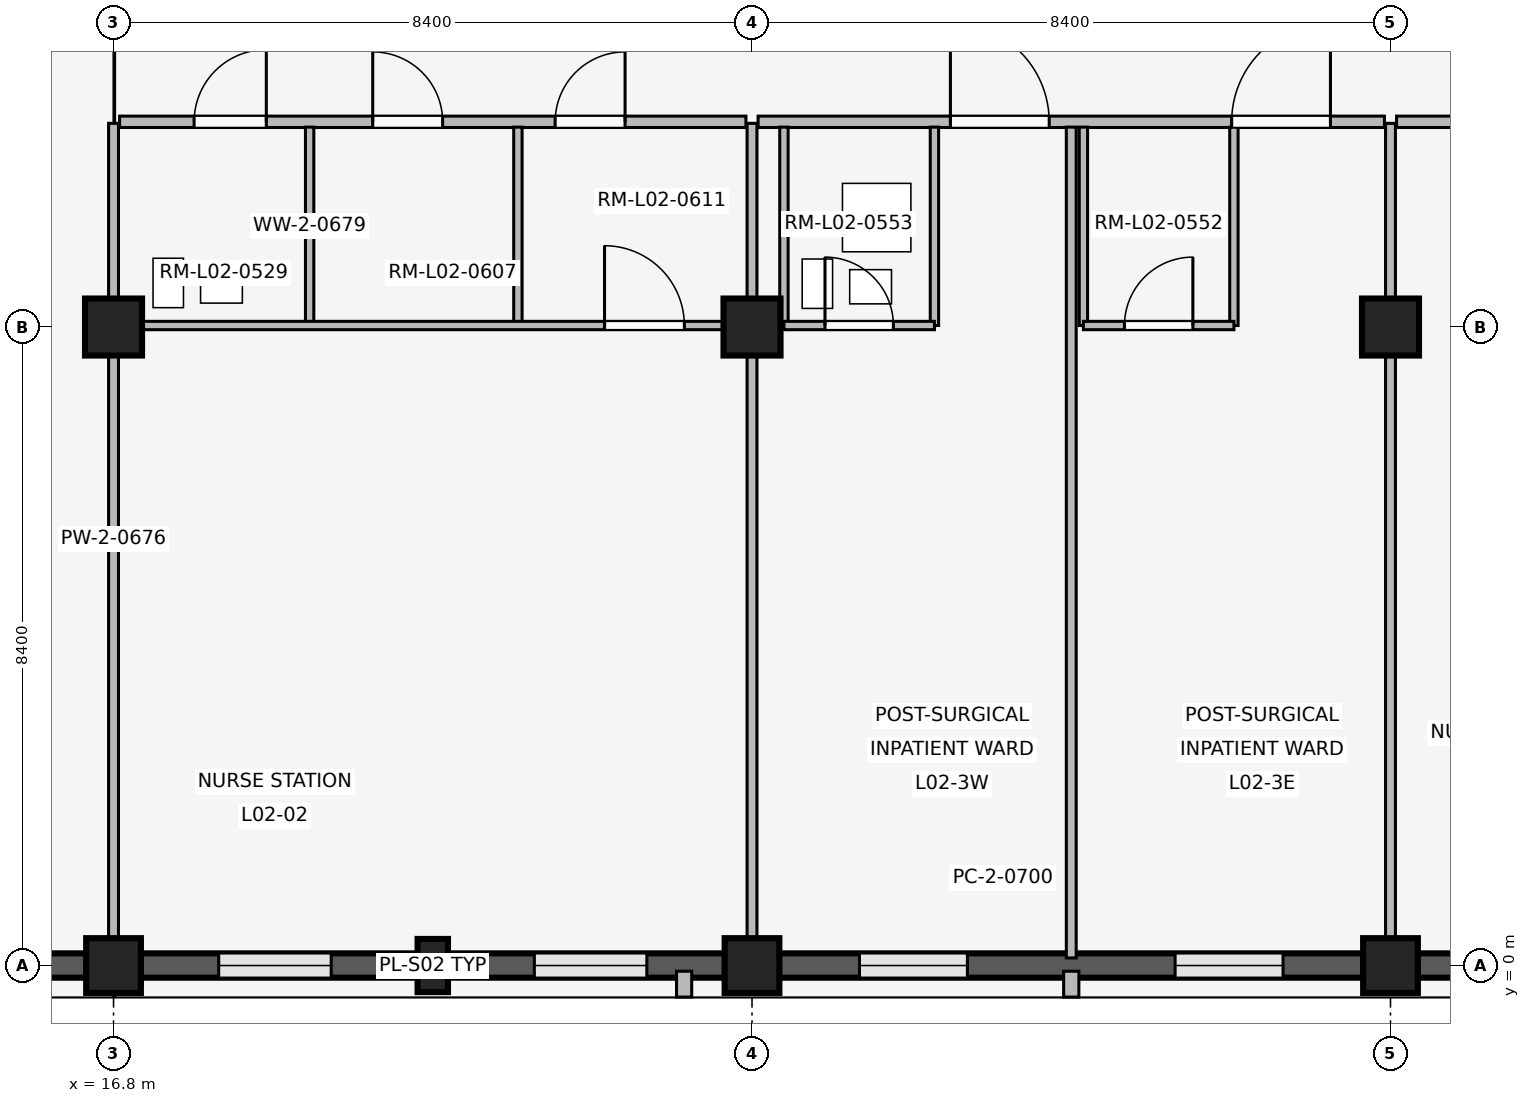
"""IFC4 building model, lengths in metres.
Left out: names, types, materials, properties, quantities, classifications, styles, units other than length and angle.
Written with IfcOpenShell. Run it as: python <this file> out.ifc"""

import sys

from ifc_helpers import new_model, si_unit, direction, frame, frame_2d, origin, origin_2d, place, context, subcontext, project, spatial, rectangle, extrude, element, fill, save


model = new_model("IFC4")
c1 = context("Model", 3, precision=1e-05, world=origin(), true_north=direction((0.0, 1.0)))
c2 = subcontext(c1, "Body", "Model", "MODEL_VIEW")
j1 = project(units=[si_unit("LENGTHUNIT", "METRE"), si_unit("PLANEANGLEUNIT", "RADIAN")], contexts=[c1])
p1 = place(None, origin())
s1 = spatial("IfcSite", under=j1, at=p1, CompositionType="ELEMENT")
p2 = place(p1, origin())
s2 = spatial("IfcBuilding", under=s1, at=p2, CompositionType="ELEMENT")
p3 = place(p2, frame((0.0, 0.0, 8.1)))
s3 = spatial("IfcBuildingStorey", under=s2, at=p3, CompositionType="ELEMENT", Elevation=8.1)
p4 = place(p3, frame((16.8, 0.0, 0.0), z_axis=(0.0, 0.0, 1.0), x_axis=(1.0, 0.0, 0.0)))
e1 = element("IfcColumn", 1, at=p4, inside=s3, PredefinedType="COLUMN", context=c2, shape_type="SweptSolid", body=[
    extrude(rectangle(XDim=0.72, YDim=0.72, at=origin_2d()), origin(), (0.0, 0.0, 1.0), 4.8),
])
p5 = place(p3, frame((16.8, 8.4, 0.0), z_axis=(0.0, 0.0, 1.0), x_axis=(1.0, 0.0, 0.0)))
e2 = element("IfcColumn", 2, at=p5, inside=s3, PredefinedType="COLUMN", context=c2, shape_type="SweptSolid", body=[
    extrude(rectangle(XDim=0.75, YDim=0.75, at=origin_2d()), origin(), (0.0, 0.0, 1.0), 4.8),
])
p6 = place(p3, frame((25.2, 0.0, 0.0), z_axis=(0.0, 0.0, 1.0), x_axis=(1.0, 0.0, 0.0)))
e3 = element("IfcColumn", 3, at=p6, inside=s3, PredefinedType="COLUMN", context=c2, shape_type="SweptSolid", body=[
    extrude(rectangle(XDim=0.72, YDim=0.72, at=origin_2d()), origin(), (0.0, 0.0, 1.0), 4.8),
])
p7 = place(p3, frame((25.2, 8.4, 0.0), z_axis=(0.0, 0.0, 1.0), x_axis=(1.0, 0.0, 0.0)))
e4 = element("IfcColumn", 4, at=p7, inside=s3, PredefinedType="COLUMN", context=c2, shape_type="SweptSolid", body=[
    extrude(rectangle(XDim=0.75, YDim=0.75, at=origin_2d()), origin(), (0.0, 0.0, 1.0), 4.8),
])
p8 = place(p3, frame((33.6, 0.0, 0.0), z_axis=(0.0, 0.0, 1.0), x_axis=(1.0, 0.0, 0.0)))
e5 = element("IfcColumn", 5, at=p8, inside=s3, PredefinedType="COLUMN", context=c2, shape_type="SweptSolid", body=[
    extrude(rectangle(XDim=0.72, YDim=0.72, at=origin_2d()), origin(), (0.0, 0.0, 1.0), 4.8),
])
p9 = place(p3, frame((33.6, 8.4, 0.0), z_axis=(0.0, 0.0, 1.0), x_axis=(1.0, 0.0, 0.0)))
e6 = element("IfcColumn", 6, at=p9, inside=s3, PredefinedType="COLUMN", context=c2, shape_type="SweptSolid", body=[
    extrude(rectangle(XDim=0.75, YDim=0.75, at=origin_2d()), origin(), (0.0, 0.0, 1.0), 4.8),
])
p10 = place(p3, frame((21.0, 0.0, 0.0), z_axis=(0.0, 0.0, 1.0), x_axis=(1.0, 0.0, 0.0)))
e7 = element("IfcColumn", 7, at=p10, inside=s3, PredefinedType="PILASTER", context=c2, shape_type="SweptSolid", body=[
    extrude(rectangle(XDim=0.4, YDim=0.7, at=origin_2d()), origin(), (0.0, 0.0, 1.0), 4.8),
])
p11 = place(p3, frame((16.445, 0.0, 0.0), z_axis=(0.0, 0.0, 1.0), x_axis=(-1.0, 0.0, 0.0)))
e8 = element("IfcWall", 8, at=p11, inside=s3, PredefinedType="SOLIDWALL", context=c2, shape_type="SweptSolid", body=[
    extrude(rectangle(XDim=7.69, YDim=0.32, at=frame_2d((3.845, 0.0))), origin(), (0.0, 0.0, 1.0), 3.86),
])
p12 = place(p11, frame((0.979, 0.0, 0.85)))
e9 = element("IfcOpeningElement", 9, at=p12, cuts=e8, PredefinedType="OPENING", context=c2, shape_type="SweptSolid", body=[
    extrude(rectangle(XDim=1.58, YDim=1.7, at=frame_2d((0.79, 0.85))), frame((0.0, 0.17, 0.0), z_axis=(0.0, -1.0, 0.0), x_axis=(1.0, 0.0, 0.0)), (0.0, 0.0, 1.0), 0.34),
])
p13 = place(p11, frame((5.131, 0.0, 0.85)))
e10 = element("IfcOpeningElement", 10, at=p13, cuts=e8, PredefinedType="OPENING", context=c2, shape_type="SweptSolid", body=[
    extrude(rectangle(XDim=1.58, YDim=1.7, at=frame_2d((0.79, 0.85))), frame((0.0, 0.17, 0.0), z_axis=(0.0, -1.0, 0.0), x_axis=(1.0, 0.0, 0.0)), (0.0, 0.0, 1.0), 0.34),
])
p14 = place(p3, frame((24.845, 0.0, 0.0), z_axis=(0.0, 0.0, 1.0), x_axis=(-1.0, 0.0, 0.0)))
e11 = element("IfcWall", 11, at=p14, inside=s3, PredefinedType="SOLIDWALL", context=c2, shape_type="SweptSolid", body=[
    extrude(rectangle(XDim=7.69, YDim=0.32, at=frame_2d((3.845, 0.0))), origin(), (0.0, 0.0, 1.0), 3.86),
])
p15 = place(p14, frame((1.029, 0.0, 0.85)))
e12 = element("IfcOpeningElement", 12, at=p15, cuts=e11, PredefinedType="OPENING", context=c2, shape_type="SweptSolid", body=[
    extrude(rectangle(XDim=1.48, YDim=1.6, at=frame_2d((0.74, 0.8))), frame((0.0, 0.17, 0.0), z_axis=(0.0, -1.0, 0.0), x_axis=(1.0, 0.0, 0.0)), (0.0, 0.0, 1.0), 0.34),
])
p16 = place(p14, frame((5.181, 0.0, 0.85)))
e13 = element("IfcOpeningElement", 13, at=p16, cuts=e11, PredefinedType="OPENING", context=c2, shape_type="SweptSolid", body=[
    extrude(rectangle(XDim=1.48, YDim=1.6, at=frame_2d((0.74, 0.8))), frame((0.0, 0.17, 0.0), z_axis=(0.0, -1.0, 0.0), x_axis=(1.0, 0.0, 0.0)), (0.0, 0.0, 1.0), 0.34),
])
p17 = place(p3, frame((24.307, -0.075, 0.0), z_axis=(0.0, 0.0, 1.0), x_axis=(0.0, -1.0, 0.0)))
e14 = element("IfcWall", 14, at=p17, inside=s3, PredefinedType="ELEMENTEDWALL", context=c2, shape_type="SweptSolid", body=[
    extrude(rectangle(XDim=0.34, YDim=0.2, at=frame_2d((0.17, 0.0))), origin(), (0.0, 0.0, 1.0), 3.84),
])
p18 = place(p3, frame((33.245, 0.0, 0.0), z_axis=(0.0, 0.0, 1.0), x_axis=(-1.0, 0.0, 0.0)))
e15 = element("IfcWall", 15, at=p18, inside=s3, PredefinedType="SOLIDWALL", context=c2, shape_type="SweptSolid", body=[
    extrude(rectangle(XDim=7.69, YDim=0.32, at=frame_2d((3.845, 0.0))), origin(), (0.0, 0.0, 1.0), 3.86),
])
p19 = place(p18, frame((1.059, 0.0, 0.85)))
e16 = element("IfcOpeningElement", 16, at=p19, cuts=e15, PredefinedType="OPENING", context=c2, shape_type="SweptSolid", body=[
    extrude(rectangle(XDim=1.42, YDim=1.45, at=frame_2d((0.71, 0.725))), frame((0.0, 0.17, 0.0), z_axis=(0.0, -1.0, 0.0), x_axis=(1.0, 0.0, 0.0)), (0.0, 0.0, 1.0), 0.34),
])
p20 = place(p18, frame((5.211, 0.0, 0.85)))
e17 = element("IfcOpeningElement", 17, at=p20, cuts=e15, PredefinedType="OPENING", context=c2, shape_type="SweptSolid", body=[
    extrude(rectangle(XDim=1.42, YDim=1.45, at=frame_2d((0.71, 0.725))), frame((0.0, 0.17, 0.0), z_axis=(0.0, -1.0, 0.0), x_axis=(1.0, 0.0, 0.0)), (0.0, 0.0, 1.0), 0.34),
])
p21 = place(p3, frame((29.4, -0.075, 0.0), z_axis=(0.0, 0.0, 1.0), x_axis=(0.0, -1.0, 0.0)))
e18 = element("IfcWall", 18, at=p21, inside=s3, PredefinedType="ELEMENTEDWALL", context=c2, shape_type="SweptSolid", body=[
    extrude(rectangle(XDim=0.34, YDim=0.2, at=frame_2d((0.17, 0.0))), origin(), (0.0, 0.0, 1.0), 3.84),
])
p22 = place(p3, frame((41.645, 0.0, 0.0), z_axis=(0.0, 0.0, 1.0), x_axis=(-1.0, 0.0, 0.0)))
e19 = element("IfcWall", 19, at=p22, inside=s3, PredefinedType="SOLIDWALL", context=c2, shape_type="SweptSolid", body=[
    extrude(rectangle(XDim=7.69, YDim=0.32, at=frame_2d((3.845, 0.0))), origin(), (0.0, 0.0, 1.0), 3.86),
])
p23 = place(p22, frame((5.091, 0.0, 0.85)))
e20 = element("IfcOpeningElement", 20, at=p23, cuts=e19, PredefinedType="OPENING", context=c2, shape_type="SweptSolid", body=[
    extrude(rectangle(XDim=1.66, YDim=1.95, at=frame_2d((0.83, 0.975))), frame((0.0, 0.17, 0.0), z_axis=(0.0, -1.0, 0.0), x_axis=(1.0, 0.0, 0.0)), (0.0, 0.0, 1.0), 0.34),
])
p24 = place(p3, frame((16.8, 0.14, 0.0), z_axis=(0.0, 0.0, 1.0), x_axis=(0.0, 1.0, 0.0)))
e21 = element("IfcWall", 21, at=p24, inside=s3, PredefinedType="PARTITIONING", context=c2, shape_type="SweptSolid", body=[
    extrude(rectangle(XDim=10.94, YDim=0.13, at=frame_2d((5.47, 0.0))), origin(), (0.0, 0.0, 1.0), 3.84),
])
p25 = place(p3, frame((16.88, 11.1, 0.0), z_axis=(0.0, 0.0, 1.0), x_axis=(1.0, 0.0, 0.0)))
e22 = element("IfcWall", 22, at=p25, inside=s3, PredefinedType="PARTITIONING", context=c2, shape_type="SweptSolid", body=[
    extrude(rectangle(XDim=8.24, YDim=0.15, at=frame_2d((4.12, 0.0))), origin(), (0.0, 0.0, 1.0), 3.84),
])
p26 = place(p25, frame((0.98, 0.0, 0.0)))
e23 = element("IfcOpeningElement", 23, at=p26, cuts=e22, PredefinedType="OPENING", context=c2, shape_type="SweptSolid", body=[
    extrude(rectangle(XDim=0.95, YDim=2.15, at=frame_2d((0.475, 1.075))), frame((0.0, 0.085, 0.0), z_axis=(0.0, -1.0, 0.0), x_axis=(1.0, 0.0, 0.0)), (0.0, 0.0, 1.0), 0.17),
])
p27 = place(p25, frame((3.33, 0.0, 0.0)))
e24 = element("IfcOpeningElement", 24, at=p27, cuts=e22, PredefinedType="OPENING", context=c2, shape_type="SweptSolid", body=[
    extrude(rectangle(XDim=0.92, YDim=2.1, at=frame_2d((0.46, 1.05))), frame((0.0, 0.085, 0.0), z_axis=(0.0, -1.0, 0.0), x_axis=(1.0, 0.0, 0.0)), (0.0, 0.0, 1.0), 0.17),
])
p28 = place(p25, frame((5.73, 0.0, 0.0)))
e25 = element("IfcOpeningElement", 25, at=p28, cuts=e22, PredefinedType="OPENING", context=c2, shape_type="SweptSolid", body=[
    extrude(rectangle(XDim=0.92, YDim=2.1, at=frame_2d((0.46, 1.05))), frame((0.0, 0.085, 0.0), z_axis=(0.0, -1.0, 0.0), x_axis=(1.0, 0.0, 0.0)), (0.0, 0.0, 1.0), 0.17),
])
for number, where, z_axis, x_axis in (
    (26, (19.38, 8.44, 0.0), (0.0, 0.0, 1.0), (0.0, 1.0, 0.0)),
    (27, (22.12, 8.44, 0.0), (0.0, 0.0, 1.0), (0.0, 1.0, 0.0)),
):
    element("IfcWall", number, at=place(p3, frame(where, z_axis=z_axis, x_axis=x_axis)), inside=s3, PredefinedType="PARTITIONING", context=c2, shape_type="SweptSolid", body=[
        extrude(rectangle(XDim=2.59, YDim=0.11, at=frame_2d((1.295, 0.0))), origin(), (0.0, 0.0, 1.0), 3.84),
    ])
p29 = place(p3, frame((16.88, 8.42, 0.0), z_axis=(0.0, 0.0, 1.0), x_axis=(1.0, 0.0, 0.0)))
e28 = element("IfcWall", 28, at=p29, inside=s3, PredefinedType="PARTITIONING", context=c2, shape_type="SweptSolid", body=[
    extrude(rectangle(XDim=8.24, YDim=0.11, at=frame_2d((4.12, 0.0))), origin(), (0.0, 0.0, 1.0), 3.84),
])
p30 = place(p29, frame((6.38, 0.0, 0.0)))
e29 = element("IfcOpeningElement", 29, at=p30, cuts=e28, PredefinedType="OPENING", context=c2, shape_type="SweptSolid", body=[
    extrude(rectangle(XDim=1.05, YDim=2.2, at=frame_2d((0.525, 1.1))), frame((0.0, 0.065, 0.0), z_axis=(0.0, -1.0, 0.0), x_axis=(1.0, 0.0, 0.0)), (0.0, 0.0, 1.0), 0.13),
])
p31 = place(p3, frame((25.2, 0.14, 0.0), z_axis=(0.0, 0.0, 1.0), x_axis=(0.0, 1.0, 0.0)))
e30 = element("IfcWall", 30, at=p31, inside=s3, PredefinedType="PARTITIONING", context=c2, shape_type="SweptSolid", body=[
    extrude(rectangle(XDim=10.94, YDim=0.13, at=frame_2d((5.47, 0.0))), origin(), (0.0, 0.0, 1.0), 3.84),
])
p32 = place(p3, frame((25.28, 11.1, 0.0), z_axis=(0.0, 0.0, 1.0), x_axis=(1.0, 0.0, 0.0)))
e31 = element("IfcWall", 31, at=p32, inside=s3, PredefinedType="PARTITIONING", context=c2, shape_type="SweptSolid", body=[
    extrude(rectangle(XDim=8.24, YDim=0.15, at=frame_2d((4.12, 0.0))), origin(), (0.0, 0.0, 1.0), 3.84),
])
p33 = place(p32, frame((2.53, 0.0, 0.0)))
e32 = element("IfcOpeningElement", 32, at=p33, cuts=e31, PredefinedType="OPENING", context=c2, shape_type="SweptSolid", body=[
    extrude(rectangle(XDim=1.3, YDim=2.25, at=frame_2d((0.65, 1.125))), frame((0.0, 0.085, 0.0), z_axis=(0.0, -1.0, 0.0), x_axis=(1.0, 0.0, 0.0)), (0.0, 0.0, 1.0), 0.17),
])
p34 = place(p32, frame((6.23, 0.0, 0.0)))
e33 = element("IfcOpeningElement", 33, at=p34, cuts=e31, PredefinedType="OPENING", context=c2, shape_type="SweptSolid", body=[
    extrude(rectangle(XDim=1.3, YDim=2.25, at=frame_2d((0.65, 1.125))), frame((0.0, 0.085, 0.0), z_axis=(0.0, -1.0, 0.0), x_axis=(1.0, 0.0, 0.0)), (0.0, 0.0, 1.0), 0.17),
])
p35 = place(p3, frame((29.4, 0.1, 0.0), z_axis=(0.0, 0.0, 1.0), x_axis=(0.0, 1.0, 0.0)))
e34 = element("IfcWall", 34, at=p35, inside=s3, PredefinedType="PARTITIONING", context=c2, shape_type="SweptSolid", body=[
    extrude(rectangle(XDim=10.93, YDim=0.13, at=frame_2d((5.465, 0.0))), origin(), (0.0, 0.0, 1.0), 3.84),
])
for number, where, z_axis, x_axis in (
    (35, (25.62, 8.42, 0.0), (0.0, 0.0, 1.0), (0.0, 1.0, 0.0)),
    (36, (27.6, 8.42, 0.0), (0.0, 0.0, 1.0), (0.0, 1.0, 0.0)),
):
    element("IfcWall", number, at=place(p3, frame(where, z_axis=z_axis, x_axis=x_axis)), inside=s3, PredefinedType="PARTITIONING", context=c2, shape_type="SweptSolid", body=[
        extrude(rectangle(XDim=2.61, YDim=0.11, at=frame_2d((1.305, 0.0))), origin(), (0.0, 0.0, 1.0), 3.84),
    ])
p36 = place(p3, frame((25.62, 8.42, 0.0), z_axis=(0.0, 0.0, 1.0), x_axis=(1.0, 0.0, 0.0)))
e37 = element("IfcWall", 37, at=p36, inside=s3, PredefinedType="PARTITIONING", context=c2, shape_type="SweptSolid", body=[
    extrude(rectangle(XDim=1.98, YDim=0.11, at=frame_2d((0.99, 0.0))), origin(), (0.0, 0.0, 1.0), 3.84),
])
p37 = place(p36, frame((0.54, 0.0, 0.0)))
e38 = element("IfcOpeningElement", 38, at=p37, cuts=e37, PredefinedType="OPENING", context=c2, shape_type="SweptSolid", body=[
    extrude(rectangle(XDim=0.9, YDim=2.1, at=frame_2d((0.45, 1.05))), frame((0.0, 0.065, 0.0), z_axis=(0.0, -1.0, 0.0), x_axis=(1.0, 0.0, 0.0)), (0.0, 0.0, 1.0), 0.13),
])
for number, where, z_axis, x_axis in (
    (39, (29.56, 8.42, 0.0), (0.0, 0.0, 1.0), (0.0, 1.0, 0.0)),
    (40, (31.54, 8.42, 0.0), (0.0, 0.0, 1.0), (0.0, 1.0, 0.0)),
):
    element("IfcWall", number, at=place(p3, frame(where, z_axis=z_axis, x_axis=x_axis)), inside=s3, PredefinedType="PARTITIONING", context=c2, shape_type="SweptSolid", body=[
        extrude(rectangle(XDim=2.61, YDim=0.11, at=frame_2d((1.305, 0.0))), origin(), (0.0, 0.0, 1.0), 3.84),
    ])
p38 = place(p3, frame((29.56, 8.42, 0.0), z_axis=(0.0, 0.0, 1.0), x_axis=(1.0, 0.0, 0.0)))
e41 = element("IfcWall", 41, at=p38, inside=s3, PredefinedType="PARTITIONING", context=c2, shape_type="SweptSolid", body=[
    extrude(rectangle(XDim=1.98, YDim=0.11, at=frame_2d((0.99, 0.0))), origin(), (0.0, 0.0, 1.0), 3.84),
])
p39 = place(p38, frame((0.54, 0.0, 0.0)))
e42 = element("IfcOpeningElement", 42, at=p39, cuts=e41, PredefinedType="OPENING", context=c2, shape_type="SweptSolid", body=[
    extrude(rectangle(XDim=0.9, YDim=2.1, at=frame_2d((0.45, 1.05))), frame((0.0, 0.065, 0.0), z_axis=(0.0, -1.0, 0.0), x_axis=(1.0, 0.0, 0.0)), (0.0, 0.0, 1.0), 0.13),
])
p40 = place(p3, frame((28.05, 1.15, 0.0), z_axis=(0.0, 0.0, 1.0), x_axis=(1.0, 0.0, 0.0)))
e43 = element("IfcWall", 43, at=p40, inside=s3, PredefinedType="PLUMBINGWALL", context=c2, shape_type="SweptSolid", body=[
    extrude(rectangle(XDim=0.9, YDim=0.24, at=frame_2d((0.45, 0.0))), origin(), (0.0, 0.0, 1.0), 3.84),
])
p41 = place(p3, frame((33.6, 0.14, 0.0), z_axis=(0.0, 0.0, 1.0), x_axis=(0.0, 1.0, 0.0)))
e44 = element("IfcWall", 44, at=p41, inside=s3, PredefinedType="PARTITIONING", context=c2, shape_type="SweptSolid", body=[
    extrude(rectangle(XDim=10.94, YDim=0.13, at=frame_2d((5.47, 0.0))), origin(), (0.0, 0.0, 1.0), 3.84),
])
p42 = place(p3, frame((33.68, 11.1, 0.0), z_axis=(0.0, 0.0, 1.0), x_axis=(1.0, 0.0, 0.0)))
e45 = element("IfcWall", 45, at=p42, inside=s3, PredefinedType="PARTITIONING", context=c2, shape_type="SweptSolid", body=[
    extrude(rectangle(XDim=5.78, YDim=0.15, at=frame_2d((2.89, 0.0))), origin(), (0.0, 0.0, 1.0), 3.84),
])
p43 = place(p42, frame((2.38, 0.0, 0.0)))
e46 = element("IfcOpeningElement", 46, at=p43, cuts=e45, PredefinedType="OPENING", context=c2, shape_type="SweptSolid", body=[
    extrude(rectangle(XDim=1.25, YDim=2.2, at=frame_2d((0.625, 1.1))), frame((0.0, 0.085, 0.0), z_axis=(0.0, -1.0, 0.0), x_axis=(1.0, 0.0, 0.0)), (0.0, 0.0, 1.0), 0.17),
])
p44 = place(p15, origin())
e47 = element("IfcWindow", 47, at=p44, inside=s3, PartitioningType="SINGLE_PANEL", PredefinedType="WINDOW", context=c2, shape_type="SweptSolid", body=[
    extrude(rectangle(XDim=1.48, YDim=1.6, at=frame_2d((0.74, 0.8))), frame((0.0, 0.03, 0.0), z_axis=(0.0, -1.0, 0.0), x_axis=(1.0, 0.0, 0.0)), (0.0, 0.0, 1.0), 0.06),
])
fill(e12, e47)
p45 = place(p16, origin())
e48 = element("IfcWindow", 48, at=p45, inside=s3, PartitioningType="SINGLE_PANEL", PredefinedType="WINDOW", context=c2, shape_type="SweptSolid", body=[
    extrude(rectangle(XDim=1.48, YDim=1.6, at=frame_2d((0.74, 0.8))), frame((0.0, 0.03, 0.0), z_axis=(0.0, -1.0, 0.0), x_axis=(1.0, 0.0, 0.0)), (0.0, 0.0, 1.0), 0.06),
])
fill(e13, e48)
p46 = place(p19, origin())
e49 = element("IfcWindow", 49, at=p46, inside=s3, PartitioningType="SINGLE_PANEL", PredefinedType="WINDOW", context=c2, shape_type="SweptSolid", body=[
    extrude(rectangle(XDim=1.42, YDim=1.45, at=frame_2d((0.71, 0.725))), frame((0.0, 0.03, 0.0), z_axis=(0.0, -1.0, 0.0), x_axis=(1.0, 0.0, 0.0)), (0.0, 0.0, 1.0), 0.06),
])
fill(e16, e49)
p47 = place(p20, origin())
e50 = element("IfcWindow", 50, at=p47, inside=s3, PartitioningType="SINGLE_PANEL", PredefinedType="WINDOW", context=c2, shape_type="SweptSolid", body=[
    extrude(rectangle(XDim=1.42, YDim=1.45, at=frame_2d((0.71, 0.725))), frame((0.0, 0.03, 0.0), z_axis=(0.0, -1.0, 0.0), x_axis=(1.0, 0.0, 0.0)), (0.0, 0.0, 1.0), 0.06),
])
fill(e17, e50)
p48 = place(p26, origin())
e51 = element("IfcDoor", 51, at=p48, inside=s3, OperationType="SINGLE_SWING_RIGHT", PredefinedType="DOOR", context=c2, shape_type="SweptSolid", body=[
    extrude(rectangle(XDim=0.95, YDim=2.15, at=frame_2d((0.475, 1.075))), frame((0.0, 0.025, 0.0), z_axis=(0.0, -1.0, 0.0), x_axis=(1.0, 0.0, 0.0)), (0.0, 0.0, 1.0), 0.05),
])
fill(e23, e51)
p49 = place(p27, origin())
e52 = element("IfcDoor", 52, at=p49, inside=s3, OperationType="SINGLE_SWING_LEFT", PredefinedType="DOOR", context=c2, shape_type="SweptSolid", body=[
    extrude(rectangle(XDim=0.92, YDim=2.1, at=frame_2d((0.46, 1.05))), frame((0.0, 0.025, 0.0), z_axis=(0.0, -1.0, 0.0), x_axis=(1.0, 0.0, 0.0)), (0.0, 0.0, 1.0), 0.05),
])
fill(e24, e52)
p50 = place(p28, origin())
e53 = element("IfcDoor", 53, at=p50, inside=s3, OperationType="SINGLE_SWING_RIGHT", PredefinedType="DOOR", context=c2, shape_type="SweptSolid", body=[
    extrude(rectangle(XDim=0.92, YDim=2.1, at=frame_2d((0.46, 1.05))), frame((0.0, 0.025, 0.0), z_axis=(0.0, -1.0, 0.0), x_axis=(1.0, 0.0, 0.0)), (0.0, 0.0, 1.0), 0.05),
])
fill(e25, e53)
p51 = place(p30, origin())
e54 = element("IfcDoor", 54, at=p51, inside=s3, OperationType="SINGLE_SWING_LEFT", PredefinedType="DOOR", context=c2, shape_type="SweptSolid", body=[
    extrude(rectangle(XDim=1.05, YDim=2.2, at=frame_2d((0.525, 1.1))), frame((0.0, 0.025, 0.0), z_axis=(0.0, -1.0, 0.0), x_axis=(1.0, 0.0, 0.0)), (0.0, 0.0, 1.0), 0.05),
])
fill(e29, e54)
p52 = place(p33, origin())
e55 = element("IfcDoor", 55, at=p52, inside=s3, OperationType="SINGLE_SWING_LEFT", PredefinedType="DOOR", context=c2, shape_type="SweptSolid", body=[
    extrude(rectangle(XDim=1.3, YDim=2.25, at=frame_2d((0.65, 1.125))), frame((0.0, 0.025, 0.0), z_axis=(0.0, -1.0, 0.0), x_axis=(1.0, 0.0, 0.0)), (0.0, 0.0, 1.0), 0.05),
])
fill(e32, e55)
p53 = place(p34, origin())
e56 = element("IfcDoor", 56, at=p53, inside=s3, OperationType="SINGLE_SWING_RIGHT", PredefinedType="DOOR", context=c2, shape_type="SweptSolid", body=[
    extrude(rectangle(XDim=1.3, YDim=2.25, at=frame_2d((0.65, 1.125))), frame((0.0, 0.025, 0.0), z_axis=(0.0, -1.0, 0.0), x_axis=(1.0, 0.0, 0.0)), (0.0, 0.0, 1.0), 0.05),
])
fill(e33, e56)
p54 = place(p37, origin())
e57 = element("IfcDoor", 57, at=p54, inside=s3, OperationType="SINGLE_SWING_LEFT", PredefinedType="DOOR", context=c2, shape_type="SweptSolid", body=[
    extrude(rectangle(XDim=0.9, YDim=2.1, at=frame_2d((0.45, 1.05))), frame((0.0, 0.025, 0.0), z_axis=(0.0, -1.0, 0.0), x_axis=(1.0, 0.0, 0.0)), (0.0, 0.0, 1.0), 0.05),
])
fill(e38, e57)
p55 = place(p39, origin())
e58 = element("IfcDoor", 58, at=p55, inside=s3, OperationType="SINGLE_SWING_RIGHT", PredefinedType="DOOR", context=c2, shape_type="SweptSolid", body=[
    extrude(rectangle(XDim=0.9, YDim=2.1, at=frame_2d((0.45, 1.05))), frame((0.0, 0.025, 0.0), z_axis=(0.0, -1.0, 0.0), x_axis=(1.0, 0.0, 0.0)), (0.0, 0.0, 1.0), 0.05),
])
fill(e42, e58)
save(model, sys.argv[1])
